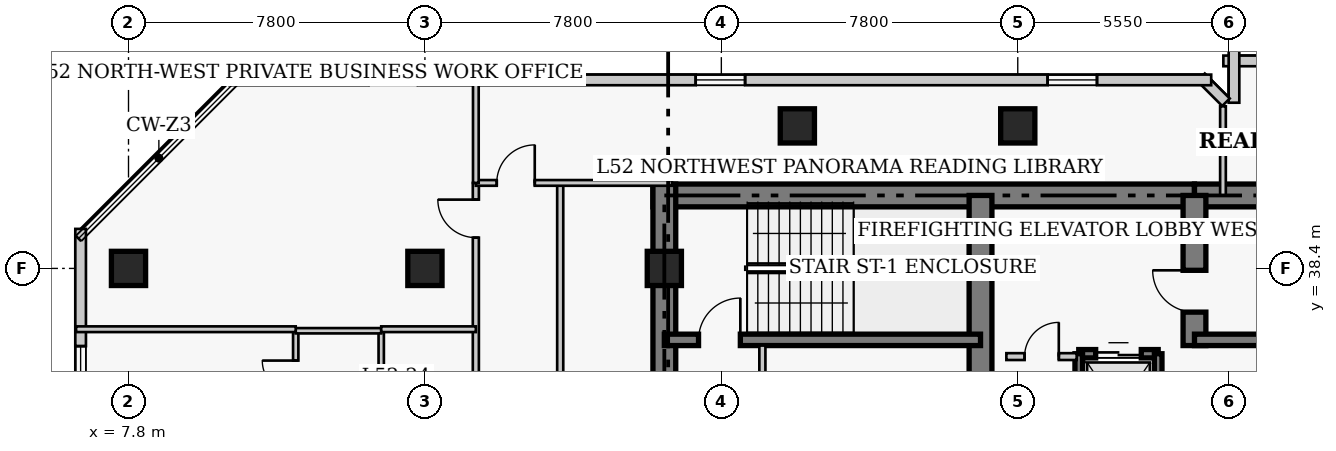
"""IFC4 building model, lengths in metres.
Left out: names, types, materials, properties, quantities, classifications, styles, units other than length and angle.
Written with IfcOpenShell. Run it as: python <this file> out.ifc"""

import sys

from ifc_helpers import new_model, si_unit, direction, frame, frame_2d, origin, origin_2d, place, context, subcontext, project, spatial, rectangle, extrude, element, fill, save


model = new_model("IFC4")
c1 = context("Model", 3, precision=1e-05, world=origin(), true_north=direction((0.0, 1.0)))
c2 = subcontext(c1, "Body", "Model", "MODEL_VIEW")
j1 = project(units=[si_unit("LENGTHUNIT", "METRE"), si_unit("PLANEANGLEUNIT", "RADIAN")], contexts=[c1])
p1 = place(None, origin())
s1 = spatial("IfcSite", under=j1, at=p1, CompositionType="ELEMENT")
p2 = place(p1, origin())
s2 = spatial("IfcBuilding", under=s1, at=p2, CompositionType="ELEMENT")
p3 = place(p2, frame((0.0, 0.0, 208.5)))
s3 = spatial("IfcBuildingStorey", under=s2, at=p3, CompositionType="ELEMENT", Elevation=208.5)
p4 = place(p3, frame((21.6, 40.32, 0.0), z_axis=(0.0, 0.0, 1.0), x_axis=(1.0, 0.0, 0.0)))
e1 = element("IfcWall", 1, at=p4, inside=s3, PredefinedType="SHEAR", context=c2, shape_type="SweptSolid", body=[
    extrude(rectangle(XDim=14.25, YDim=0.6, at=frame_2d((7.125, 0.0))), origin(), (0.0, 0.0, 1.0), 3.9),
])
p5 = place(p3, frame((35.85, 40.32, 0.0), z_axis=(0.0, 0.0, 1.0), x_axis=(1.0, 0.0, 0.0)))
e2 = element("IfcWall", 2, at=p5, inside=s3, PredefinedType="SHEAR", context=c2, shape_type="SweptSolid", body=[
    extrude(rectangle(XDim=12.6, YDim=0.6, at=frame_2d((6.3, 0.0))), origin(), (0.0, 0.0, 1.0), 3.9),
])
p6 = place(p3, frame((21.9, 27.05, 0.0), z_axis=(0.0, 0.0, 1.0), x_axis=(0.0, 1.0, 0.0)))
e3 = element("IfcWall", 3, at=p6, inside=s3, PredefinedType="SHEAR", context=c2, shape_type="SweptSolid", body=[
    extrude(rectangle(XDim=13.57, YDim=0.6, at=frame_2d((6.785, 0.0))), origin(), (0.0, 0.0, 1.0), 3.9),
])
p7 = place(p3, frame((30.22, 33.05, 0.0), z_axis=(0.0, 0.0, 1.0), x_axis=(0.0, 1.0, 0.0)))
e4 = element("IfcWall", 4, at=p7, inside=s3, PredefinedType="SHEAR", context=c2, shape_type="SweptSolid", body=[
    extrude(rectangle(XDim=7.27, YDim=0.6, at=frame_2d((3.635, 0.0))), origin(), (0.0, 0.0, 1.0), 3.9),
])
p8 = place(p3, frame((35.85, 36.37, 0.0), z_axis=(0.0, 0.0, 1.0), x_axis=(0.0, 1.0, 0.0)))
e5 = element("IfcWall", 5, at=p8, inside=s3, PredefinedType="SHEAR", context=c2, shape_type="SweptSolid", body=[
    extrude(rectangle(XDim=3.95, YDim=0.6, at=frame_2d((1.975, 0.0))), origin(), (0.0, 0.0, 1.0), 3.9),
])
p9 = place(p8, frame((0.88, 0.0, 0.0)))
e6 = element("IfcOpeningElement", 6, at=p9, cuts=e5, PredefinedType="OPENING", context=c2, shape_type="SweptSolid", body=[
    extrude(rectangle(XDim=1.1, YDim=2.15, at=frame_2d((0.55, 1.075))), frame((0.0, 0.31, 0.0), z_axis=(0.0, -1.0, 0.0), x_axis=(1.0, 0.0, 0.0)), (0.0, 0.0, 1.0), 0.62),
])
p10 = place(p3, frame((21.9, 36.52, 0.0), z_axis=(0.0, 0.0, 1.0), x_axis=(1.0, 0.0, 0.0)))
e7 = element("IfcWall", 7, at=p10, inside=s3, PredefinedType="SHEAR", context=c2, shape_type="SweptSolid", body=[
    extrude(rectangle(XDim=8.32, YDim=0.3, at=frame_2d((4.16, 0.0))), origin(), (0.0, 0.0, 1.0), 3.9),
])
p11 = place(p10, frame((0.9, 0.0, 0.0)))
e8 = element("IfcOpeningElement", 8, at=p11, cuts=e7, PredefinedType="OPENING", context=c2, shape_type="SweptSolid", body=[
    extrude(rectangle(XDim=1.1, YDim=2.15, at=frame_2d((0.55, 1.075))), frame((0.0, 0.16, 0.0), z_axis=(0.0, -1.0, 0.0), x_axis=(1.0, 0.0, 0.0)), (0.0, 0.0, 1.0), 0.32),
])
p12 = place(p3, frame((35.85, 36.52, 0.0), z_axis=(0.0, 0.0, 1.0), x_axis=(1.0, 0.0, 0.0)))
e9 = element("IfcWall", 9, at=p12, inside=s3, PredefinedType="SHEAR", context=c2, shape_type="SweptSolid", body=[
    extrude(rectangle(XDim=8.33, YDim=0.3, at=frame_2d((4.165, 0.0))), origin(), (0.0, 0.0, 1.0), 3.9),
])
for number, where, z_axis, x_axis in (
    (10, (7.8, 38.4, 0.0), (0.0, 0.0, 1.0), (1.0, 0.0, 0.0)),
    (11, (15.6, 38.4, 0.0), (0.0, 0.0, 1.0), (1.0, 0.0, 0.0)),
    (12, (21.9, 38.4, 0.0), (0.0, 0.0, 1.0), (1.0, 0.0, 0.0)),
    (13, (25.4, 42.15, 0.0), (0.0, 0.0, 1.0), (1.0, 0.0, 0.0)),
    (14, (31.2, 42.15, 0.0), (0.0, 0.0, 1.0), (1.0, 0.0, 0.0)),
):
    element("IfcColumn", number, at=place(p3, frame(where, z_axis=z_axis, x_axis=x_axis)), inside=s3, PredefinedType="COLUMN", context=c2, shape_type="SweptSolid", body=[
        extrude(rectangle(XDim=0.9, YDim=0.9, at=origin_2d()), origin(), (0.0, 0.0, 1.0), 3.9),
    ])
p13 = place(p3, frame((41.39, 43.86, 0.0), z_axis=(0.0, 0.0, 1.0), x_axis=(-1.0, 0.0, 0.0)))
e15 = element("IfcWall", 15, at=p13, inside=s3, PredefinedType="SOLIDWALL", context=c2, shape_type="SweptSolid", body=[
    extrude(rectangle(XDim=4.78, YDim=0.28, at=frame_2d((2.39, 0.0))), origin(), (0.0, 0.0, 1.0), 3.65),
])
p14 = place(p13, frame((1.74, 0.0, 0.85)))
e16 = element("IfcOpeningElement", 16, at=p14, cuts=e15, PredefinedType="OPENING", context=c2, shape_type="SweptSolid", body=[
    extrude(rectangle(XDim=1.3, YDim=1.7, at=frame_2d((0.65, 0.85))), frame((0.0, 0.15, 0.0), z_axis=(0.0, -1.0, 0.0), x_axis=(1.0, 0.0, 0.0)), (0.0, 0.0, 1.0), 0.3),
])
p15 = place(p3, frame((36.89, 44.14, 0.0), z_axis=(0.0, 0.0, 1.0), x_axis=(0.0, -1.0, 0.0)))
e17 = element("IfcWall", 17, at=p15, inside=s3, PredefinedType="SOLIDWALL", context=c2, shape_type="SweptSolid", body=[
    extrude(rectangle(XDim=1.38, YDim=0.28, at=frame_2d((0.69, 0.0))), origin(), (0.0, 0.0, 1.0), 3.65),
])
p16 = place(p3, frame((36.679, 42.773, 0.0), z_axis=(0.0, 0.0, 1.0), x_axis=(-0.707106781187, 0.707106781187, 0.0)))
e18 = element("IfcWall", 18, at=p16, inside=s3, PredefinedType="SOLIDWALL", context=c2, shape_type="SweptSolid", body=[
    extrude(rectangle(XDim=0.928, YDim=0.28, at=frame_2d((0.464, 0.0))), origin(), (0.0, 0.0, 1.0), 3.65),
])
p17 = place(p3, frame((36.29, 43.36, 0.0), z_axis=(0.0, 0.0, 1.0), x_axis=(-1.0, 0.0, 0.0)))
e19 = element("IfcWall", 19, at=p17, inside=s3, PredefinedType="SOLIDWALL", context=c2, shape_type="SweptSolid", body=[
    extrude(rectangle(XDim=25.83, YDim=0.28, at=frame_2d((12.915, 0.0))), origin(), (0.0, 0.0, 1.0), 3.65),
])
p18 = place(p17, frame((3.005, 0.0, 0.85)))
e20 = element("IfcOpeningElement", 20, at=p18, cuts=e19, PredefinedType="OPENING", context=c2, shape_type="SweptSolid", body=[
    extrude(rectangle(XDim=1.3, YDim=1.7, at=frame_2d((0.65, 0.85))), frame((0.0, 0.15, 0.0), z_axis=(0.0, -1.0, 0.0), x_axis=(1.0, 0.0, 0.0)), (0.0, 0.0, 1.0), 0.3),
])
p19 = place(p17, frame((12.265, 0.0, 0.85)))
e21 = element("IfcOpeningElement", 21, at=p19, cuts=e19, PredefinedType="OPENING", context=c2, shape_type="SweptSolid", body=[
    extrude(rectangle(XDim=1.3, YDim=1.7, at=frame_2d((0.65, 0.85))), frame((0.0, 0.15, 0.0), z_axis=(0.0, -1.0, 0.0), x_axis=(1.0, 0.0, 0.0)), (0.0, 0.0, 1.0), 0.3),
])
p20 = place(p17, frame((20.875, 0.0, 0.85)))
e22 = element("IfcOpeningElement", 22, at=p20, cuts=e19, PredefinedType="OPENING", context=c2, shape_type="SweptSolid", body=[
    extrude(rectangle(XDim=1.3, YDim=1.7, at=frame_2d((0.65, 0.85))), frame((0.0, 0.15, 0.0), z_axis=(0.0, -1.0, 0.0), x_axis=(1.0, 0.0, 0.0)), (0.0, 0.0, 1.0), 0.3),
])
p21 = place(p3, frame((6.54, 39.44, 0.0), z_axis=(0.0, 0.0, 1.0), x_axis=(0.0, -1.0, 0.0)))
e23 = element("IfcWall", 23, at=p21, inside=s3, PredefinedType="SOLIDWALL", context=c2, shape_type="SweptSolid", body=[
    extrude(rectangle(XDim=29.88, YDim=0.28, at=frame_2d((14.94, 0.0))), origin(), (0.0, 0.0, 1.0), 3.65),
])
p22 = place(p21, frame((3.085, 0.0, 0.85)))
e24 = element("IfcOpeningElement", 24, at=p22, cuts=e23, PredefinedType="OPENING", context=c2, shape_type="SweptSolid", body=[
    extrude(rectangle(XDim=1.3, YDim=1.7, at=frame_2d((0.65, 0.85))), frame((0.0, 0.15, 0.0), z_axis=(0.0, -1.0, 0.0), x_axis=(1.0, 0.0, 0.0)), (0.0, 0.0, 1.0), 0.3),
])
p23 = place(p21, frame((11.205, 0.0, 0.85)))
e25 = element("IfcOpeningElement", 25, at=p23, cuts=e23, PredefinedType="OPENING", context=c2, shape_type="SweptSolid", body=[
    extrude(rectangle(XDim=1.3, YDim=1.7, at=frame_2d((0.65, 0.85))), frame((0.0, 0.15, 0.0), z_axis=(0.0, -1.0, 0.0), x_axis=(1.0, 0.0, 0.0)), (0.0, 0.0, 1.0), 0.3),
])
p24 = place(p21, frame((17.375, 0.0, 0.85)))
e26 = element("IfcOpeningElement", 26, at=p24, cuts=e23, PredefinedType="OPENING", context=c2, shape_type="SweptSolid", body=[
    extrude(rectangle(XDim=1.3, YDim=1.7, at=frame_2d((0.65, 0.85))), frame((0.0, 0.15, 0.0), z_axis=(0.0, -1.0, 0.0), x_axis=(1.0, 0.0, 0.0)), (0.0, 0.0, 1.0), 0.3),
])
p25 = place(p21, frame((25.495, 0.0, 0.85)))
e27 = element("IfcOpeningElement", 27, at=p25, cuts=e23, PredefinedType="OPENING", context=c2, shape_type="SweptSolid", body=[
    extrude(rectangle(XDim=1.3, YDim=1.7, at=frame_2d((0.65, 0.85))), frame((0.0, 0.15, 0.0), z_axis=(0.0, -1.0, 0.0), x_axis=(1.0, 0.0, 0.0)), (0.0, 0.0, 1.0), 0.3),
])
p26 = place(p3, frame((32.805, 36.155, 0.0), z_axis=(0.0, 0.0, 1.0), x_axis=(1.0, 0.0, 0.0)))
e28 = element("IfcWall", 28, at=p26, inside=s3, PredefinedType="SHEAR", context=c2, shape_type="SweptSolid", body=[
    extrude(rectangle(XDim=2.09, YDim=0.22, at=frame_2d((1.045, 0.0))), origin(), (0.0, 0.0, 1.0), 3.9),
])
p27 = place(p26, frame((0.445, 0.0, 0.0)))
e29 = element("IfcOpeningElement", 29, at=p27, cuts=e28, PredefinedType="OPENING", context=c2, shape_type="SweptSolid", body=[
    extrude(rectangle(XDim=1.2, YDim=2.15, at=frame_2d((0.6, 1.075))), frame((0.0, 0.12, 0.0), z_axis=(0.0, -1.0, 0.0), x_axis=(1.0, 0.0, 0.0)), (0.0, 0.0, 1.0), 0.24),
])
for number, where, z_axis, x_axis in (
    (30, (32.805, 33.245, 0.0), (0.0, 0.0, 1.0), (0.0, 1.0, 0.0)),
    (31, (34.895, 33.245, 0.0), (0.0, 0.0, 1.0), (0.0, 1.0, 0.0)),
):
    element("IfcWall", number, at=place(p3, frame(where, z_axis=z_axis, x_axis=x_axis)), inside=s3, PredefinedType="SHEAR", context=c2, shape_type="SweptSolid", body=[
        extrude(rectangle(XDim=2.91, YDim=0.2, at=frame_2d((1.455, 0.0))), origin(), (0.0, 0.0, 1.0), 3.9),
    ])
p28 = place(p3, frame((30.9, 36.08, 0.0), z_axis=(0.0, 0.0, 1.0), x_axis=(1.0, 0.0, 0.0)))
e32 = element("IfcWall", 32, at=p28, inside=s3, PredefinedType="PARTITIONING", context=c2, shape_type="SweptSolid", body=[
    extrude(rectangle(XDim=1.85, YDim=0.18, at=frame_2d((0.925, 0.0))), origin(), (0.0, 0.0, 1.0), 3.65),
])
p29 = place(p28, frame((0.48, 0.0, 0.0)))
e33 = element("IfcOpeningElement", 33, at=p29, cuts=e32, PredefinedType="OPENING", context=c2, shape_type="SweptSolid", body=[
    extrude(rectangle(XDim=0.9, YDim=2.15, at=frame_2d((0.45, 1.075))), frame((0.0, 0.1, 0.0), z_axis=(0.0, -1.0, 0.0), x_axis=(1.0, 0.0, 0.0)), (0.0, 0.0, 1.0), 0.2),
])
p30 = place(p3, frame((24.48, 32.8, 0.0), z_axis=(0.0, 0.0, 1.0), x_axis=(0.0, 1.0, 0.0)))
e34 = element("IfcWall", 34, at=p30, inside=s3, PredefinedType="PARTITIONING", context=c2, shape_type="SweptSolid", body=[
    extrude(rectangle(XDim=3.57, YDim=0.16, at=frame_2d((1.785, 0.0))), origin(), (0.0, 0.0, 1.0), 3.65),
])
p31 = place(p30, frame((1.604, 0.0, 0.0)))
e35 = element("IfcOpeningElement", 35, at=p31, cuts=e34, PredefinedType="OPENING", context=c2, shape_type="SweptSolid", body=[
    extrude(rectangle(XDim=0.9, YDim=2.1, at=frame_2d((0.45, 1.05))), frame((0.0, 0.09, 0.0), z_axis=(0.0, -1.0, 0.0), x_axis=(1.0, 0.0, 0.0)), (0.0, 0.0, 1.0), 0.18),
])
p32 = place(p3, frame((16.94, 7.55, 0.0), z_axis=(0.0, 0.0, 1.0), x_axis=(0.0, 1.0, 0.0)))
e36 = element("IfcWall", 36, at=p32, inside=s3, PredefinedType="PARTITIONING", context=c2, shape_type="SweptSolid", body=[
    extrude(rectangle(XDim=33.1, YDim=0.16, at=frame_2d((16.55, 0.0))), origin(), (0.0, 0.0, 1.0), 3.65),
])
p33 = place(p32, frame((0.46, 0.0, 0.0)))
e37 = element("IfcOpeningElement", 37, at=p33, cuts=e36, PredefinedType="OPENING", context=c2, shape_type="SweptSolid", body=[
    extrude(rectangle(XDim=0.95, YDim=2.1, at=frame_2d((0.475, 1.05))), frame((0.0, 0.09, 0.0), z_axis=(0.0, -1.0, 0.0), x_axis=(1.0, 0.0, 0.0)), (0.0, 0.0, 1.0), 0.18),
])
p34 = place(p32, frame((7.575, 0.0, 0.0)))
e38 = element("IfcOpeningElement", 38, at=p34, cuts=e36, PredefinedType="OPENING", context=c2, shape_type="SweptSolid", body=[
    extrude(rectangle(XDim=0.95, YDim=2.1, at=frame_2d((0.475, 1.05))), frame((0.0, 0.09, 0.0), z_axis=(0.0, -1.0, 0.0), x_axis=(1.0, 0.0, 0.0)), (0.0, 0.0, 1.0), 0.18),
])
p35 = place(p32, frame((16.375, 0.0, 0.0)))
e39 = element("IfcOpeningElement", 39, at=p35, cuts=e36, PredefinedType="OPENING", context=c2, shape_type="SweptSolid", body=[
    extrude(rectangle(XDim=0.95, YDim=2.1, at=frame_2d((0.475, 1.05))), frame((0.0, 0.09, 0.0), z_axis=(0.0, -1.0, 0.0), x_axis=(1.0, 0.0, 0.0)), (0.0, 0.0, 1.0), 0.18),
])
p36 = place(p32, frame((24.775, 0.0, 0.0)))
e40 = element("IfcOpeningElement", 40, at=p36, cuts=e36, PredefinedType="OPENING", context=c2, shape_type="SweptSolid", body=[
    extrude(rectangle(XDim=0.95, YDim=2.1, at=frame_2d((0.475, 1.05))), frame((0.0, 0.09, 0.0), z_axis=(0.0, -1.0, 0.0), x_axis=(1.0, 0.0, 0.0)), (0.0, 0.0, 1.0), 0.18),
])
p37 = place(p32, frame((31.66, 0.0, 0.0)))
e41 = element("IfcOpeningElement", 41, at=p37, cuts=e36, PredefinedType="OPENING", context=c2, shape_type="SweptSolid", body=[
    extrude(rectangle(XDim=1.0, YDim=2.15, at=frame_2d((0.5, 1.075))), frame((0.0, 0.09, 0.0), z_axis=(0.0, -1.0, 0.0), x_axis=(1.0, 0.0, 0.0)), (0.0, 0.0, 1.0), 0.18),
])
p38 = place(p3, frame((19.16, 35.02, 0.0), z_axis=(0.0, 0.0, 1.0), x_axis=(0.0, 1.0, 0.0)))
e42 = element("IfcWall", 42, at=p38, inside=s3, PredefinedType="PARTITIONING", context=c2, shape_type="SweptSolid", body=[
    extrude(rectangle(XDim=5.63, YDim=0.16, at=frame_2d((2.815, 0.0))), origin(), (0.0, 0.0, 1.0), 3.65),
])
p39 = place(p3, frame((16.94, 40.65, 0.0), z_axis=(0.0, 0.0, 1.0), x_axis=(1.0, 0.0, 0.0)))
e43 = element("IfcWall", 43, at=p39, inside=s3, PredefinedType="PARTITIONING", context=c2, shape_type="SweptSolid", body=[
    extrude(rectangle(XDim=5.16, YDim=0.15, at=frame_2d((2.58, 0.0))), origin(), (0.0, 0.0, 1.0), 3.65),
])
p40 = place(p39, frame((0.55, 0.0, 0.0)))
e44 = element("IfcOpeningElement", 44, at=p40, cuts=e43, PredefinedType="OPENING", context=c2, shape_type="SweptSolid", body=[
    extrude(rectangle(XDim=1.0, YDim=2.15, at=frame_2d((0.5, 1.075))), frame((0.0, 0.085, 0.0), z_axis=(0.0, -1.0, 0.0), x_axis=(1.0, 0.0, 0.0)), (0.0, 0.0, 1.0), 0.17),
])
p41 = place(p3, frame((16.94, 40.65, 0.0), z_axis=(0.0, 0.0, 1.0), x_axis=(0.0, 1.0, 0.0)))
e45 = element("IfcWall", 45, at=p41, inside=s3, PredefinedType="PARTITIONING", context=c2, shape_type="SweptSolid", body=[
    extrude(rectangle(XDim=2.83, YDim=0.15, at=frame_2d((1.415, 0.0))), origin(), (0.0, 0.0, 1.0), 3.65),
])
p42 = place(p3, frame((36.6, 40.32, 0.0), z_axis=(0.0, 0.0, 1.0), x_axis=(0.0, 1.0, 0.0)))
e46 = element("IfcWall", 46, at=p42, inside=s3, PredefinedType="PARTITIONING", context=c2, shape_type="SweptSolid", body=[
    extrude(rectangle(XDim=2.345, YDim=0.15, at=frame_2d((1.172, 0.0))), origin(), (0.0, 0.0, 1.0), 3.65),
])
p43 = place(p3, frame((12.2, 34.31, 0.0), z_axis=(0.0, 0.0, 1.0), x_axis=(0.0, 1.0, 0.0)))
e47 = element("IfcWall", 47, at=p43, inside=s3, PredefinedType="PLUMBINGWALL", context=c2, shape_type="SweptSolid", body=[
    extrude(rectangle(XDim=2.45, YDim=0.14, at=frame_2d((1.225, 0.0))), origin(), (0.0, 0.0, 1.0), 3.65),
])
p44 = place(p43, frame((0.785, 0.0, 0.0)))
e48 = element("IfcOpeningElement", 48, at=p44, cuts=e47, PredefinedType="OPENING", context=c2, shape_type="SweptSolid", body=[
    extrude(rectangle(XDim=0.88, YDim=2.05, at=frame_2d((0.44, 1.025))), frame((0.0, 0.08, 0.0), z_axis=(0.0, -1.0, 0.0), x_axis=(1.0, 0.0, 0.0)), (0.0, 0.0, 1.0), 0.16),
])
p45 = place(p3, frame((14.45, 34.31, 0.0), z_axis=(0.0, 0.0, 1.0), x_axis=(0.0, 1.0, 0.0)))
e49 = element("IfcWall", 49, at=p45, inside=s3, PredefinedType="PLUMBINGWALL", context=c2, shape_type="SweptSolid", body=[
    extrude(rectangle(XDim=2.45, YDim=0.14, at=frame_2d((1.225, 0.0))), origin(), (0.0, 0.0, 1.0), 3.65),
])
p46 = place(p3, frame((12.2, 36.76, 0.0), z_axis=(0.0, 0.0, 1.0), x_axis=(1.0, 0.0, 0.0)))
e50 = element("IfcWall", 50, at=p46, inside=s3, PredefinedType="PLUMBINGWALL", context=c2, shape_type="SweptSolid", body=[
    extrude(rectangle(XDim=2.25, YDim=0.14, at=frame_2d((1.125, 0.0))), origin(), (0.0, 0.0, 1.0), 3.65),
])
p47 = place(p3, frame((6.42, 36.8, 0.0), z_axis=(0.0, 0.0, 1.0), x_axis=(1.0, 0.0, 0.0)))
e51 = element("IfcWall", 51, at=p47, inside=s3, PredefinedType="PARTITIONING", context=c2, shape_type="SweptSolid", body=[
    extrude(rectangle(XDim=5.78, YDim=0.15, at=frame_2d((2.89, 0.0))), origin(), (0.0, 0.0, 1.0), 3.65),
])
p48 = place(p3, frame((14.45, 36.8, 0.0), z_axis=(0.0, 0.0, 1.0), x_axis=(1.0, 0.0, 0.0)))
e52 = element("IfcWall", 52, at=p48, inside=s3, PredefinedType="PARTITIONING", context=c2, shape_type="SweptSolid", body=[
    extrude(rectangle(XDim=2.49, YDim=0.15, at=frame_2d((1.245, 0.0))), origin(), (0.0, 0.0, 1.0), 3.65),
])
p49 = place(p18, origin())
e53 = element("IfcWindow", 53, at=p49, inside=s3, PartitioningType="SINGLE_PANEL", PredefinedType="WINDOW", context=c2, shape_type="SweptSolid", body=[
    extrude(rectangle(XDim=1.3, YDim=1.7, at=frame_2d((0.65, 0.85))), frame((0.0, 0.03, 0.0), z_axis=(0.0, -1.0, 0.0), x_axis=(1.0, 0.0, 0.0)), (0.0, 0.0, 1.0), 0.06),
])
fill(e20, e53)
p50 = place(p19, origin())
e54 = element("IfcWindow", 54, at=p50, inside=s3, PartitioningType="SINGLE_PANEL", PredefinedType="WINDOW", context=c2, shape_type="SweptSolid", body=[
    extrude(rectangle(XDim=1.3, YDim=1.7, at=frame_2d((0.65, 0.85))), frame((0.0, 0.03, 0.0), z_axis=(0.0, -1.0, 0.0), x_axis=(1.0, 0.0, 0.0)), (0.0, 0.0, 1.0), 0.06),
])
fill(e21, e54)
p51 = place(p20, origin())
e55 = element("IfcWindow", 55, at=p51, inside=s3, PartitioningType="SINGLE_PANEL", PredefinedType="WINDOW", context=c2, shape_type="SweptSolid", body=[
    extrude(rectangle(XDim=1.3, YDim=1.7, at=frame_2d((0.65, 0.85))), frame((0.0, 0.03, 0.0), z_axis=(0.0, -1.0, 0.0), x_axis=(1.0, 0.0, 0.0)), (0.0, 0.0, 1.0), 0.06),
])
fill(e22, e55)
p52 = place(p22, origin())
e56 = element("IfcWindow", 56, at=p52, inside=s3, PartitioningType="SINGLE_PANEL", PredefinedType="WINDOW", context=c2, shape_type="SweptSolid", body=[
    extrude(rectangle(XDim=1.3, YDim=1.7, at=frame_2d((0.65, 0.85))), frame((0.0, 0.03, 0.0), z_axis=(0.0, -1.0, 0.0), x_axis=(1.0, 0.0, 0.0)), (0.0, 0.0, 1.0), 0.06),
])
fill(e24, e56)
p53 = place(p27, origin())
e57 = element("IfcDoor", 57, at=p53, inside=s3, OperationType="DOUBLE_DOOR_SLIDING", PredefinedType="DOOR", context=c2, shape_type="SweptSolid", body=[
    extrude(rectangle(XDim=1.2, YDim=2.15, at=frame_2d((0.6, 1.075))), frame((0.0, 0.025, 0.0), z_axis=(0.0, -1.0, 0.0), x_axis=(1.0, 0.0, 0.0)), (0.0, 0.0, 1.0), 0.05),
])
fill(e29, e57)
p54 = place(p29, origin())
e58 = element("IfcDoor", 58, at=p54, inside=s3, OperationType="SINGLE_SWING_RIGHT", PredefinedType="DOOR", context=c2, shape_type="SweptSolid", body=[
    extrude(rectangle(XDim=0.9, YDim=2.15, at=frame_2d((0.45, 1.075))), frame((0.0, 0.025, 0.0), z_axis=(0.0, -1.0, 0.0), x_axis=(1.0, 0.0, 0.0)), (0.0, 0.0, 1.0), 0.05),
])
fill(e33, e58)
p55 = place(p40, origin())
e59 = element("IfcDoor", 59, at=p55, inside=s3, OperationType="SINGLE_SWING_RIGHT", PredefinedType="DOOR", context=c2, shape_type="SweptSolid", body=[
    extrude(rectangle(XDim=1.0, YDim=2.15, at=frame_2d((0.5, 1.075))), frame((0.0, 0.025, 0.0), z_axis=(0.0, -1.0, 0.0), x_axis=(1.0, 0.0, 0.0)), (0.0, 0.0, 1.0), 0.05),
])
fill(e44, e59)
p56 = place(p44, origin())
e60 = element("IfcDoor", 60, at=p56, inside=s3, OperationType="SINGLE_SWING_RIGHT", PredefinedType="DOOR", context=c2, shape_type="SweptSolid", body=[
    extrude(rectangle(XDim=0.88, YDim=2.05, at=frame_2d((0.44, 1.025))), frame((0.0, 0.025, 0.0), z_axis=(0.0, -1.0, 0.0), x_axis=(1.0, 0.0, 0.0)), (0.0, 0.0, 1.0), 0.05),
])
fill(e48, e60)
p57 = place(p37, origin())
e61 = element("IfcDoor", 61, at=p57, inside=s3, OperationType="SINGLE_SWING_RIGHT", PredefinedType="DOOR", context=c2, shape_type="SweptSolid", body=[
    extrude(rectangle(XDim=1.0, YDim=2.15, at=frame_2d((0.5, 1.075))), frame((0.0, 0.025, 0.0), z_axis=(0.0, -1.0, 0.0), x_axis=(1.0, 0.0, 0.0)), (0.0, 0.0, 1.0), 0.05),
])
fill(e41, e61)
p58 = place(p11, origin())
e62 = element("IfcDoor", 62, at=p58, inside=s3, OperationType="SINGLE_SWING_RIGHT", PredefinedType="DOOR", context=c2, shape_type="SweptSolid", body=[
    extrude(rectangle(XDim=1.1, YDim=2.15, at=frame_2d((0.55, 1.075))), frame((0.0, 0.025, 0.0), z_axis=(0.0, -1.0, 0.0), x_axis=(1.0, 0.0, 0.0)), (0.0, 0.0, 1.0), 0.05),
])
fill(e8, e62)
p59 = place(p9, origin())
e63 = element("IfcDoor", 63, at=p59, inside=s3, OperationType="SINGLE_SWING_RIGHT", PredefinedType="DOOR", context=c2, shape_type="SweptSolid", body=[
    extrude(rectangle(XDim=1.1, YDim=2.15, at=frame_2d((0.55, 1.075))), frame((0.0, 0.025, 0.0), z_axis=(0.0, -1.0, 0.0), x_axis=(1.0, 0.0, 0.0)), (0.0, 0.0, 1.0), 0.05),
])
fill(e6, e63)
save(model, sys.argv[1])
